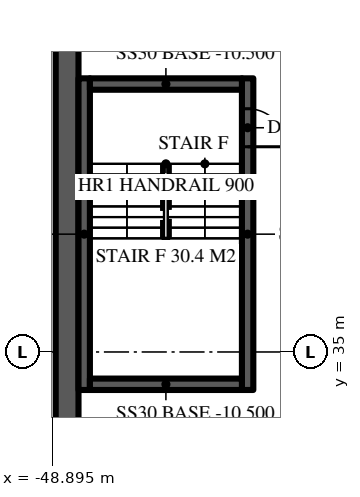
"""IFC4 building model, lengths in metres.
Left out: names, types, materials, properties, quantities, classifications, styles, units other than length and angle.
Written with IfcOpenShell. Run it as: python <this file> out.ifc"""

import sys

from ifc_helpers import new_model, si_unit, direction, frame, frame_2d, origin, place, context, subcontext, project, spatial, rectangle, extrude, element, fill, save


model = new_model("IFC4")
c1 = context("Model", 3, precision=1e-05, world=origin(), true_north=direction((0.0, 1.0)))
c2 = subcontext(c1, "Body", "Model", "MODEL_VIEW")
j1 = project(units=[si_unit("LENGTHUNIT", "METRE"), si_unit("PLANEANGLEUNIT", "RADIAN")], contexts=[c1])
p1 = place(None, origin())
s1 = spatial("IfcSite", under=j1, at=p1, CompositionType="ELEMENT")
p2 = place(p1, origin())
s2 = spatial("IfcBuilding", under=s1, at=p2, CompositionType="ELEMENT")
p3 = place(p2, frame((0.0, 0.0, -10.0)))
s3 = spatial("IfcBuildingStorey", under=s2, at=p3, CompositionType="ELEMENT", Elevation=-10.0)
p4 = place(p3, frame((-48.5, 48.2, -0.5), z_axis=(0.0, 0.0, 1.0), x_axis=(0.0, -1.0, 0.0)))
e1 = element("IfcWall", 1, at=p4, inside=s3, PredefinedType="SOLIDWALL", context=c2, shape_type="SweptSolid", body=[
    extrude(rectangle(XDim=96.4, YDim=0.6, at=frame_2d((48.2, 0.0))), origin(), (0.0, 0.0, 1.0), 10.1),
])
p5 = place(p3, frame((-43.75, 42.2, -0.5), z_axis=(0.0, 0.0, 1.0), x_axis=(0.0, -1.0, 0.0)))
e2 = element("IfcWall", 2, at=p5, inside=s3, PredefinedType="SOLIDWALL", context=c2, shape_type="SweptSolid", body=[
    extrude(rectangle(XDim=8.2, YDim=0.3, at=frame_2d((4.1, 0.0))), origin(), (0.0, 0.0, 1.0), 5.2),
])
p6 = place(p5, frame((0.8, 0.0, 0.5)))
e3 = element("IfcOpeningElement", 3, at=p6, cuts=e2, PredefinedType="OPENING", context=c2, shape_type="SweptSolid", body=[
    extrude(rectangle(XDim=1.0, YDim=2.2, at=frame_2d((0.5, 1.1))), frame((0.0, 0.16, 0.0), z_axis=(0.0, -1.0, 0.0), x_axis=(1.0, 0.0, 0.0)), (0.0, 0.0, 1.0), 0.32),
])
p7 = place(p3, frame((-48.05, 34.0, -0.5), z_axis=(0.0, 0.0, 1.0), x_axis=(0.0, 1.0, 0.0)))
e4 = element("IfcWall", 4, at=p7, inside=s3, PredefinedType="SOLIDWALL", context=c2, shape_type="SweptSolid", body=[
    extrude(rectangle(XDim=8.2, YDim=0.3, at=frame_2d((4.1, 0.0))), origin(), (0.0, 0.0, 1.0), 5.2),
])
for number, where, z_axis, x_axis in (
    (5, (-43.9, 42.05, -0.5), (0.0, 0.0, 1.0), (-1.0, 0.0, 0.0)),
    (6, (-47.9, 34.15, -0.5), (0.0, 0.0, 1.0), (1.0, 0.0, 0.0)),
):
    element("IfcWall", number, at=place(p3, frame(where, z_axis=z_axis, x_axis=x_axis)), inside=s3, PredefinedType="SOLIDWALL", context=c2, shape_type="SweptSolid", body=[
        extrude(rectangle(XDim=4.0, YDim=0.3, at=frame_2d((2.0, 0.0))), origin(), (0.0, 0.0, 1.0), 5.2),
    ])
p8 = place(p6, origin())
e7 = element("IfcDoor", 7, at=p8, inside=s3, OperationType="SINGLE_SWING_RIGHT", PredefinedType="DOOR", context=c2, shape_type="SweptSolid", body=[
    extrude(rectangle(XDim=1.0, YDim=2.2, at=frame_2d((0.5, 1.1))), frame((0.0, 0.025, 0.0), z_axis=(0.0, -1.0, 0.0), x_axis=(1.0, 0.0, 0.0)), (0.0, 0.0, 1.0), 0.05),
])
fill(e3, e7)
save(model, sys.argv[1])
